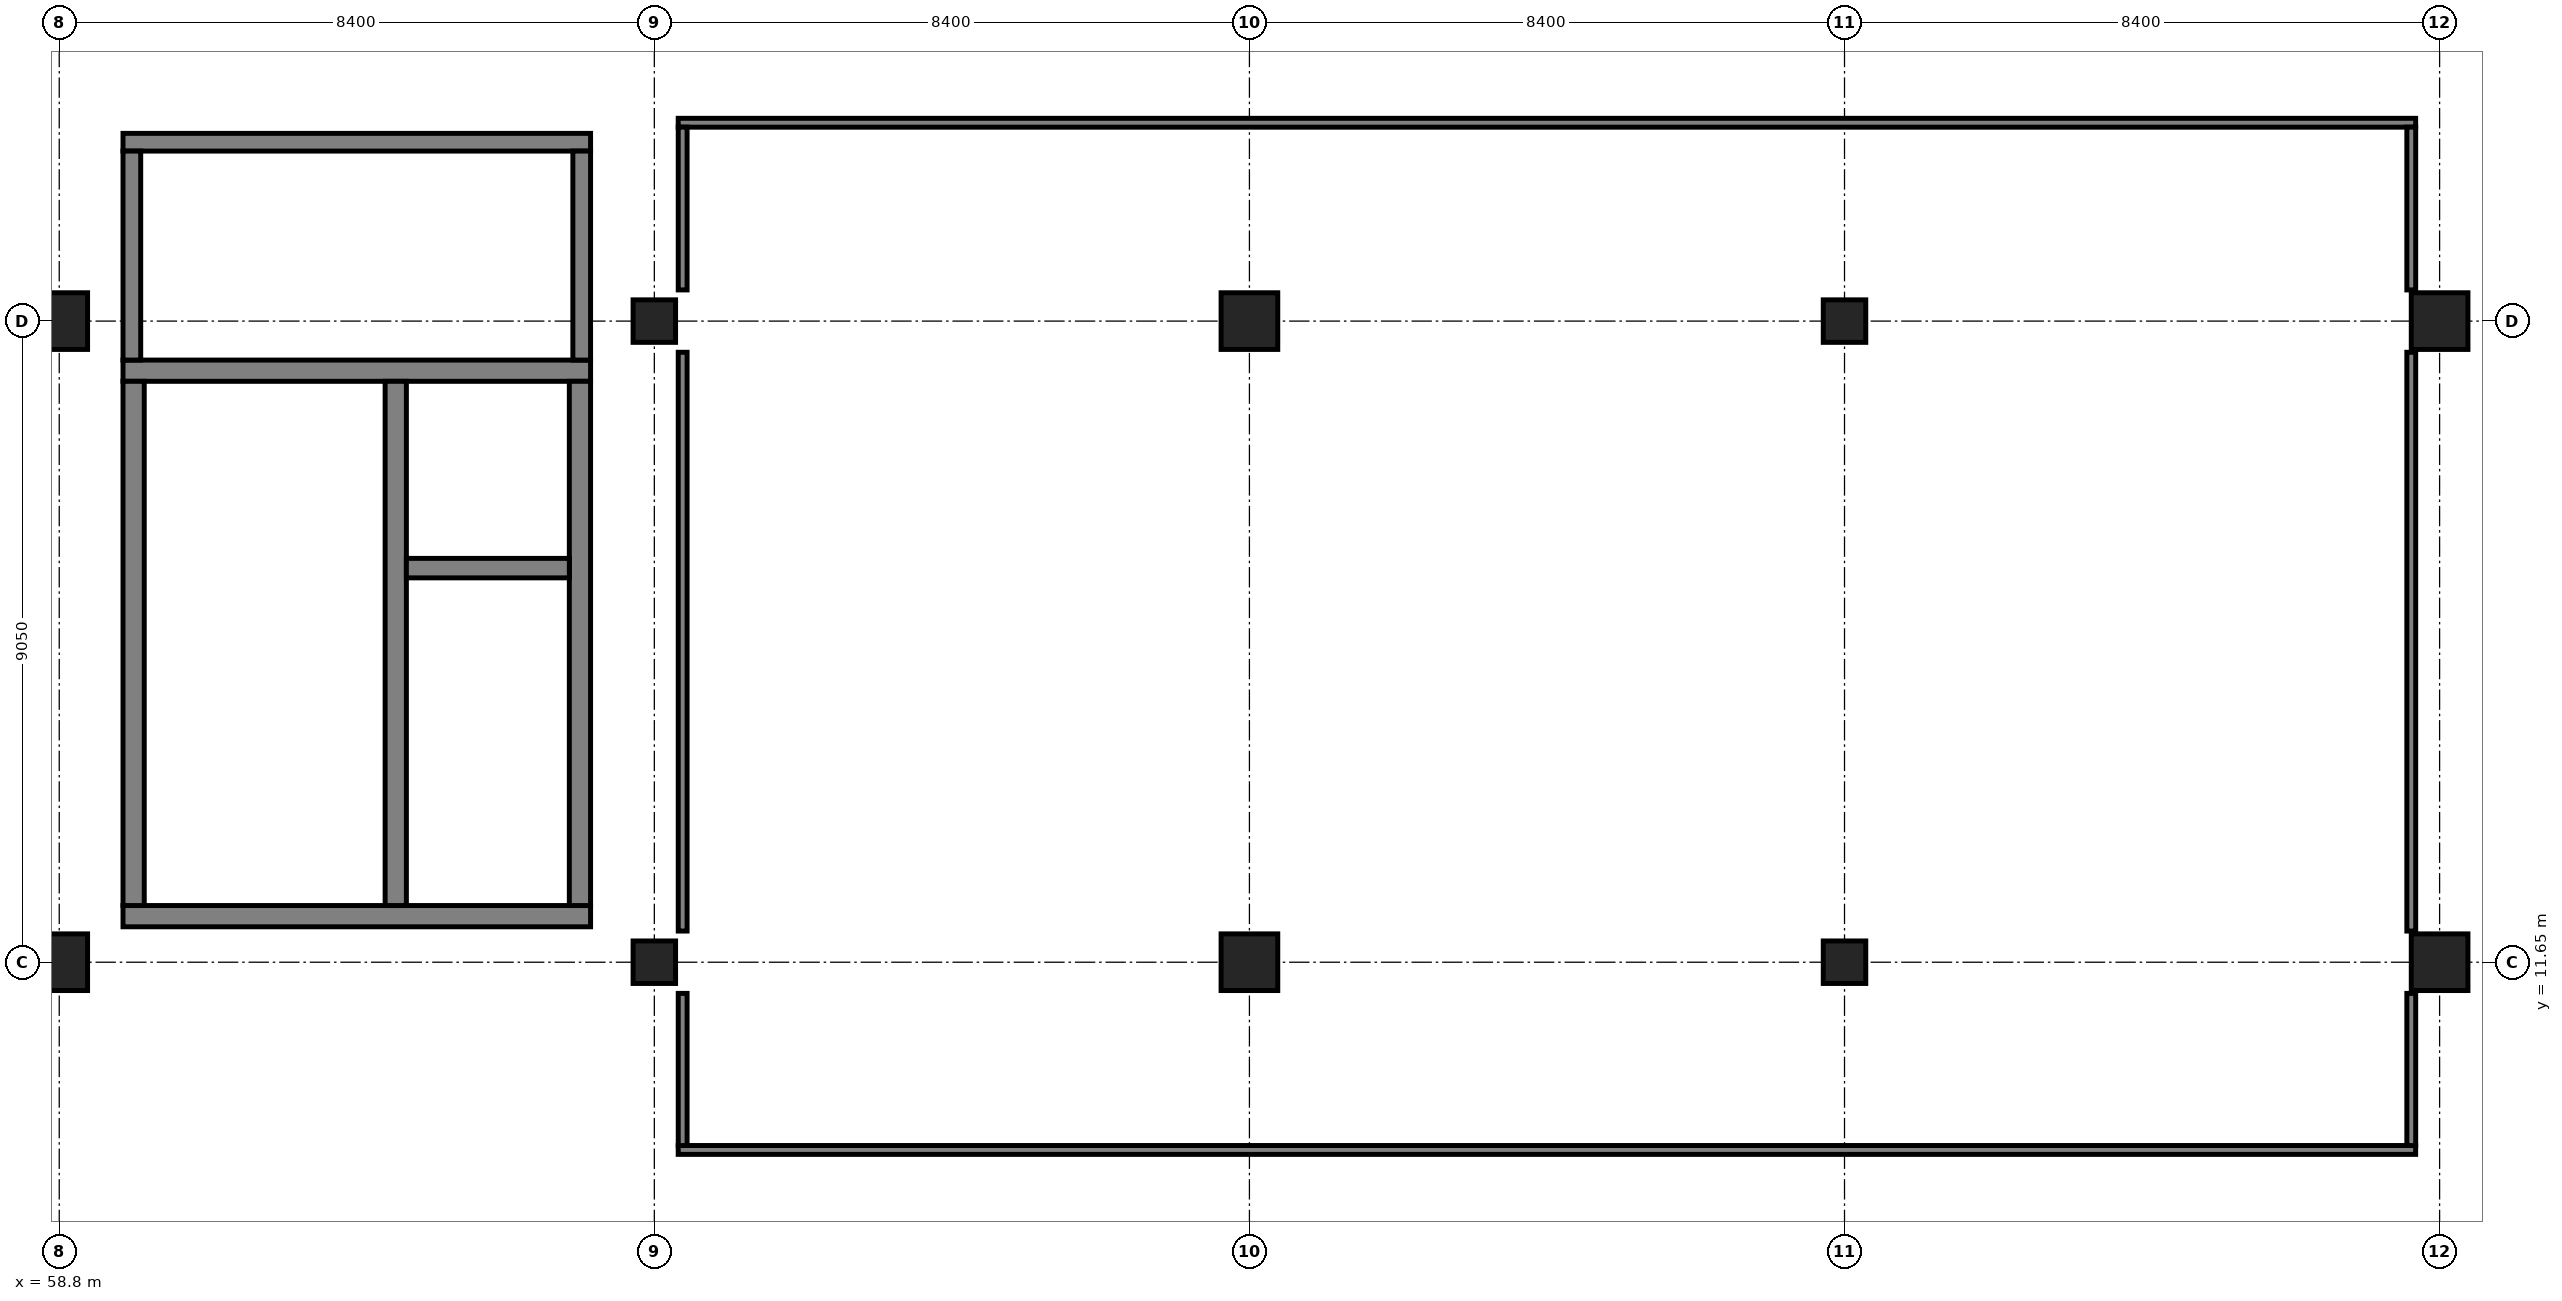
"""IFC4 building model, lengths in metres.
Left out: names, types, materials, properties, quantities, classifications, styles, units other than length and angle.
Written with IfcOpenShell. Run it as: python <this file> out.ifc"""

import sys

from ifc_helpers import new_model, si_unit, direction, frame, frame_2d, origin, origin_2d, place, context, subcontext, project, spatial, rectangle, extrude, element, fill, save


model = new_model("IFC4")
c1 = context("Model", 3, precision=1e-05, world=origin(), true_north=direction((0.0, 1.0)))
c2 = subcontext(c1, "Body", "Model", "MODEL_VIEW")
j1 = project(units=[si_unit("LENGTHUNIT", "METRE"), si_unit("PLANEANGLEUNIT", "RADIAN")], contexts=[c1])
p1 = place(None, origin())
s1 = spatial("IfcSite", under=j1, at=p1, CompositionType="ELEMENT")
p2 = place(p1, origin())
s2 = spatial("IfcBuilding", under=s1, at=p2, CompositionType="ELEMENT")
p3 = place(p2, frame((0.0, 0.0, 15.6)))
s3 = spatial("IfcBuildingStorey", under=s2, at=p3, CompositionType="ELEMENT", Elevation=15.6)
for number, where, z_axis, x_axis in (
    (1, (58.8, 11.65, 0.0), (0.0, 0.0, 1.0), (1.0, 0.0, 0.0)),
    (2, (58.8, 20.7, 0.0), (0.0, 0.0, 1.0), (1.0, 0.0, 0.0)),
):
    element("IfcColumn", number, at=place(p3, frame(where, z_axis=z_axis, x_axis=x_axis)), inside=s3, PredefinedType="COLUMN", context=c2, shape_type="SweptSolid", body=[
        extrude(rectangle(XDim=0.8, YDim=0.8, at=origin_2d()), origin(), (0.0, 0.0, 1.0), 4.5),
    ])
for number, where, z_axis, x_axis in (
    (3, (67.2, 11.65, 0.0), (0.0, 0.0, 1.0), (1.0, 0.0, 0.0)),
    (4, (67.2, 20.7, 0.0), (0.0, 0.0, 1.0), (1.0, 0.0, 0.0)),
):
    element("IfcColumn", number, at=place(p3, frame(where, z_axis=z_axis, x_axis=x_axis)), inside=s3, PredefinedType="COLUMN", context=c2, shape_type="SweptSolid", body=[
        extrude(rectangle(XDim=0.6, YDim=0.6, at=origin_2d()), origin(), (0.0, 0.0, 1.0), 4.5),
    ])
for number, where, z_axis, x_axis in (
    (5, (75.6, 11.65, 0.0), (0.0, 0.0, 1.0), (1.0, 0.0, 0.0)),
    (6, (75.6, 20.7, 0.0), (0.0, 0.0, 1.0), (1.0, 0.0, 0.0)),
):
    element("IfcColumn", number, at=place(p3, frame(where, z_axis=z_axis, x_axis=x_axis)), inside=s3, PredefinedType="COLUMN", context=c2, shape_type="SweptSolid", body=[
        extrude(rectangle(XDim=0.8, YDim=0.8, at=origin_2d()), origin(), (0.0, 0.0, 1.0), 4.5),
    ])
for number, where, z_axis, x_axis in (
    (7, (84.0, 11.65, 0.0), (0.0, 0.0, 1.0), (1.0, 0.0, 0.0)),
    (8, (84.0, 20.7, 0.0), (0.0, 0.0, 1.0), (1.0, 0.0, 0.0)),
):
    element("IfcColumn", number, at=place(p3, frame(where, z_axis=z_axis, x_axis=x_axis)), inside=s3, PredefinedType="COLUMN", context=c2, shape_type="SweptSolid", body=[
        extrude(rectangle(XDim=0.6, YDim=0.6, at=origin_2d()), origin(), (0.0, 0.0, 1.0), 4.5),
    ])
for number, where, z_axis, x_axis in (
    (9, (92.4, 11.65, 0.0), (0.0, 0.0, 1.0), (1.0, 0.0, 0.0)),
    (10, (92.4, 20.7, 0.0), (0.0, 0.0, 1.0), (1.0, 0.0, 0.0)),
):
    element("IfcColumn", number, at=place(p3, frame(where, z_axis=z_axis, x_axis=x_axis)), inside=s3, PredefinedType="COLUMN", context=c2, shape_type="SweptSolid", body=[
        extrude(rectangle(XDim=0.8, YDim=0.8, at=origin_2d()), origin(), (0.0, 0.0, 1.0), 4.5),
    ])
p4 = place(p3, frame((59.7, 12.3, 0.0), z_axis=(0.0, 0.0, 1.0), x_axis=(1.0, 0.0, 0.0)))
e11 = element("IfcWall", 11, at=p4, inside=s3, PredefinedType="SHEAR", context=c2, shape_type="SweptSolid", body=[
    extrude(rectangle(XDim=6.6, YDim=0.3, at=frame_2d((3.3, 0.0))), origin(), (0.0, 0.0, 1.0), 4.2),
])
p5 = place(p3, frame((59.7, 20.0, 0.0), z_axis=(0.0, 0.0, 1.0), x_axis=(1.0, 0.0, 0.0)))
e12 = element("IfcWall", 12, at=p5, inside=s3, PredefinedType="SHEAR", context=c2, shape_type="SweptSolid", body=[
    extrude(rectangle(XDim=6.6, YDim=0.3, at=frame_2d((3.3, 0.0))), origin(), (0.0, 0.0, 1.0), 4.2),
])
p6 = place(p5, frame((1.425, 0.0, 0.0)))
e13 = element("IfcOpeningElement", 13, at=p6, cuts=e12, PredefinedType="OPENING", context=c2, shape_type="SweptSolid", body=[
    extrude(rectangle(XDim=1.15, YDim=2.2, at=frame_2d((0.575, 1.1))), frame((0.0, 0.16, 0.0), z_axis=(0.0, -1.0, 0.0), x_axis=(1.0, 0.0, 0.0)), (0.0, 0.0, 1.0), 0.32),
])
p7 = place(p5, frame((4.5, 0.0, 0.0)))
e14 = element("IfcOpeningElement", 14, at=p7, cuts=e12, PredefinedType="OPENING", context=c2, shape_type="SweptSolid", body=[
    extrude(rectangle(XDim=1.3, YDim=2.2, at=frame_2d((0.65, 1.1))), frame((0.0, 0.16, 0.0), z_axis=(0.0, -1.0, 0.0), x_axis=(1.0, 0.0, 0.0)), (0.0, 0.0, 1.0), 0.32),
])
for number, where, z_axis, x_axis in (
    (15, (59.85, 12.45, 0.0), (0.0, 0.0, 1.0), (0.0, 1.0, 0.0)),
    (16, (66.15, 12.45, 0.0), (0.0, 0.0, 1.0), (0.0, 1.0, 0.0)),
    (17, (63.55, 12.45, 0.0), (0.0, 0.0, 1.0), (0.0, 1.0, 0.0)),
):
    element("IfcWall", number, at=place(p3, frame(where, z_axis=z_axis, x_axis=x_axis)), inside=s3, PredefinedType="SHEAR", context=c2, shape_type="SweptSolid", body=[
        extrude(rectangle(XDim=7.4, YDim=0.3, at=frame_2d((3.7, 0.0))), origin(), (0.0, 0.0, 1.0), 4.2),
    ])
p8 = place(p3, frame((63.7, 17.213, 0.0), z_axis=(0.0, 0.0, 1.0), x_axis=(1.0, 0.0, 0.0)))
e18 = element("IfcWall", 18, at=p8, inside=s3, PredefinedType="SHEAR", context=c2, shape_type="SweptSolid", body=[
    extrude(rectangle(XDim=2.3, YDim=0.275, at=frame_2d((1.15, 0.0))), origin(), (0.0, 0.0, 1.0), 4.2),
])
p9 = place(p3, frame((59.7, 23.225, 0.0), z_axis=(0.0, 0.0, 1.0), x_axis=(1.0, 0.0, 0.0)))
e19 = element("IfcWall", 19, at=p9, inside=s3, PredefinedType="PARTITIONING", context=c2, shape_type="SweptSolid", body=[
    extrude(rectangle(XDim=6.6, YDim=0.25, at=frame_2d((3.3, 0.0))), origin(), (0.0, 0.0, 1.0), 4.2),
])
p10 = place(p9, frame((2.4, 0.0, 0.0)))
e20 = element("IfcOpeningElement", 20, at=p10, cuts=e19, PredefinedType="OPENING", context=c2, shape_type="SweptSolid", body=[
    extrude(rectangle(XDim=1.8, YDim=2.25, at=frame_2d((0.9, 1.125))), frame((0.0, 0.135, 0.0), z_axis=(0.0, -1.0, 0.0), x_axis=(1.0, 0.0, 0.0)), (0.0, 0.0, 1.0), 0.27),
])
for number, where, z_axis, x_axis in (
    (21, (59.825, 20.15, 0.0), (0.0, 0.0, 1.0), (0.0, 1.0, 0.0)),
    (22, (66.175, 20.15, 0.0), (0.0, 0.0, 1.0), (0.0, 1.0, 0.0)),
):
    element("IfcWall", number, at=place(p3, frame(where, z_axis=z_axis, x_axis=x_axis)), inside=s3, PredefinedType="PARTITIONING", context=c2, shape_type="SweptSolid", body=[
        extrude(rectangle(XDim=2.95, YDim=0.25, at=frame_2d((1.475, 0.0))), origin(), (0.0, 0.0, 1.0), 3.43),
    ])
p11 = place(p3, frame((67.537, 9.0, 0.0), z_axis=(0.0, 0.0, 1.0), x_axis=(1.0, 0.0, 0.0)))
e23 = element("IfcWall", 23, at=p11, inside=s3, PredefinedType="PARTITIONING", context=c2, shape_type="SweptSolid", body=[
    extrude(rectangle(XDim=24.525, YDim=0.125, at=frame_2d((12.262, 0.0))), origin(), (0.0, 0.0, 1.0), 3.45),
])
p12 = place(p11, frame((11.482, 0.0, 0.0)))
e24 = element("IfcOpeningElement", 24, at=p12, cuts=e23, PredefinedType="OPENING", context=c2, shape_type="SweptSolid", body=[
    extrude(rectangle(XDim=1.56, YDim=2.32, at=frame_2d((0.78, 1.16))), frame((0.0, 0.073, 0.0), z_axis=(0.0, -1.0, 0.0), x_axis=(1.0, 0.0, 0.0)), (0.0, 0.0, 1.0), 0.145),
])
p13 = place(p11, frame((13.642, 0.0, 1.05)))
e25 = element("IfcOpeningElement", 25, at=p13, cuts=e23, PredefinedType="OPENING", context=c2, shape_type="SweptSolid", body=[
    extrude(rectangle(XDim=1.8, YDim=1.25, at=frame_2d((0.9, 0.625))), frame((0.0, 0.073, 0.0), z_axis=(0.0, -1.0, 0.0), x_axis=(1.0, 0.0, 0.0)), (0.0, 0.0, 1.0), 0.145),
])
p14 = place(p3, frame((67.537, 23.5, 0.0), z_axis=(0.0, 0.0, 1.0), x_axis=(1.0, 0.0, 0.0)))
e26 = element("IfcWall", 26, at=p14, inside=s3, PredefinedType="PARTITIONING", context=c2, shape_type="SweptSolid", body=[
    extrude(rectangle(XDim=24.525, YDim=0.125, at=frame_2d((12.262, 0.0))), origin(), (0.0, 0.0, 1.0), 3.43),
])
p15 = place(p3, frame((92.0, 9.062, 0.0), z_axis=(0.0, 0.0, 1.0), x_axis=(0.0, 1.0, 0.0)))
e27 = element("IfcWall", 27, at=p15, inside=s3, PredefinedType="PARTITIONING", context=c2, shape_type="SweptSolid", body=[
    extrude(rectangle(XDim=2.148, YDim=0.125, at=frame_2d((1.074, 0.0))), origin(), (0.0, 0.0, 1.0), 4.2),
])
p16 = place(p3, frame((92.0, 12.09, 0.0), z_axis=(0.0, 0.0, 1.0), x_axis=(0.0, 1.0, 0.0)))
e28 = element("IfcWall", 28, at=p16, inside=s3, PredefinedType="PARTITIONING", context=c2, shape_type="SweptSolid", body=[
    extrude(rectangle(XDim=8.17, YDim=0.125, at=frame_2d((4.085, 0.0))), origin(), (0.0, 0.0, 1.0), 3.84),
])
p17 = place(p3, frame((92.0, 21.14, 0.0), z_axis=(0.0, 0.0, 1.0), x_axis=(0.0, 1.0, 0.0)))
e29 = element("IfcWall", 29, at=p17, inside=s3, PredefinedType="PARTITIONING", context=c2, shape_type="SweptSolid", body=[
    extrude(rectangle(XDim=2.298, YDim=0.125, at=frame_2d((1.149, 0.0))), origin(), (0.0, 0.0, 1.0), 4.2),
])
p18 = place(p3, frame((67.6, 9.062, 0.0), z_axis=(0.0, 0.0, 1.0), x_axis=(0.0, 1.0, 0.0)))
e30 = element("IfcWall", 30, at=p18, inside=s3, PredefinedType="PARTITIONING", context=c2, shape_type="SweptSolid", body=[
    extrude(rectangle(XDim=2.148, YDim=0.125, at=frame_2d((1.074, 0.0))), origin(), (0.0, 0.0, 1.0), 4.2),
])
p19 = place(p3, frame((67.6, 12.09, 0.0), z_axis=(0.0, 0.0, 1.0), x_axis=(0.0, 1.0, 0.0)))
e31 = element("IfcWall", 31, at=p19, inside=s3, PredefinedType="PARTITIONING", context=c2, shape_type="SweptSolid", body=[
    extrude(rectangle(XDim=8.17, YDim=0.125, at=frame_2d((4.085, 0.0))), origin(), (0.0, 0.0, 1.0), 3.84),
])
p20 = place(p3, frame((67.6, 21.14, 0.0), z_axis=(0.0, 0.0, 1.0), x_axis=(0.0, 1.0, 0.0)))
e32 = element("IfcWall", 32, at=p20, inside=s3, PredefinedType="PARTITIONING", context=c2, shape_type="SweptSolid", body=[
    extrude(rectangle(XDim=2.298, YDim=0.125, at=frame_2d((1.149, 0.0))), origin(), (0.0, 0.0, 1.0), 4.2),
])
p21 = place(p6, frame((1.15, 0.0, 0.0), z_axis=(0.0, 0.0, 1.0), x_axis=(-1.0, 0.0, 0.0)))
e33 = element("IfcDoor", 33, at=p21, inside=s3, OperationType="SINGLE_SWING_LEFT", PredefinedType="DOOR", context=c2, shape_type="SweptSolid", body=[
    extrude(rectangle(XDim=1.15, YDim=2.2, at=frame_2d((0.575, 1.1))), frame((0.0, 0.025, 0.0), z_axis=(0.0, -1.0, 0.0), x_axis=(1.0, 0.0, 0.0)), (0.0, 0.0, 1.0), 0.05),
])
fill(e13, e33)
p22 = place(p7, origin())
e34 = element("IfcDoor", 34, at=p22, inside=s3, OperationType="DOUBLE_DOOR_SLIDING", PredefinedType="DOOR", context=c2, shape_type="SweptSolid", body=[
    extrude(rectangle(XDim=1.3, YDim=2.2, at=frame_2d((0.65, 1.1))), frame((0.0, 0.025, 0.0), z_axis=(0.0, -1.0, 0.0), x_axis=(1.0, 0.0, 0.0)), (0.0, 0.0, 1.0), 0.05),
])
fill(e14, e34)
p23 = place(p10, origin())
e35 = element("IfcDoor", 35, at=p23, inside=s3, OperationType="DOUBLE_DOOR_SINGLE_SWING", PredefinedType="DOOR", context=c2, shape_type="SweptSolid", body=[
    extrude(rectangle(XDim=1.8, YDim=2.25, at=frame_2d((0.9, 1.125))), frame((0.0, 0.025, 0.0), z_axis=(0.0, -1.0, 0.0), x_axis=(1.0, 0.0, 0.0)), (0.0, 0.0, 1.0), 0.05),
])
fill(e20, e35)
p24 = place(p12, origin())
e36 = element("IfcDoor", 36, at=p24, inside=s3, OperationType="DOUBLE_DOOR_SINGLE_SWING", PredefinedType="DOOR", context=c2, shape_type="SweptSolid", body=[
    extrude(rectangle(XDim=1.56, YDim=2.32, at=frame_2d((0.78, 1.16))), frame((0.0, 0.025, 0.0), z_axis=(0.0, -1.0, 0.0), x_axis=(1.0, 0.0, 0.0)), (0.0, 0.0, 1.0), 0.05),
])
fill(e24, e36)
p25 = place(p13, origin())
e37 = element("IfcWindow", 37, at=p25, inside=s3, PartitioningType="SINGLE_PANEL", PredefinedType="WINDOW", context=c2, shape_type="SweptSolid", body=[
    extrude(rectangle(XDim=1.8, YDim=1.25, at=frame_2d((0.9, 0.625))), frame((0.0, 0.03, 0.0), z_axis=(0.0, -1.0, 0.0), x_axis=(1.0, 0.0, 0.0)), (0.0, 0.0, 1.0), 0.06),
])
fill(e25, e37)
save(model, sys.argv[1])
